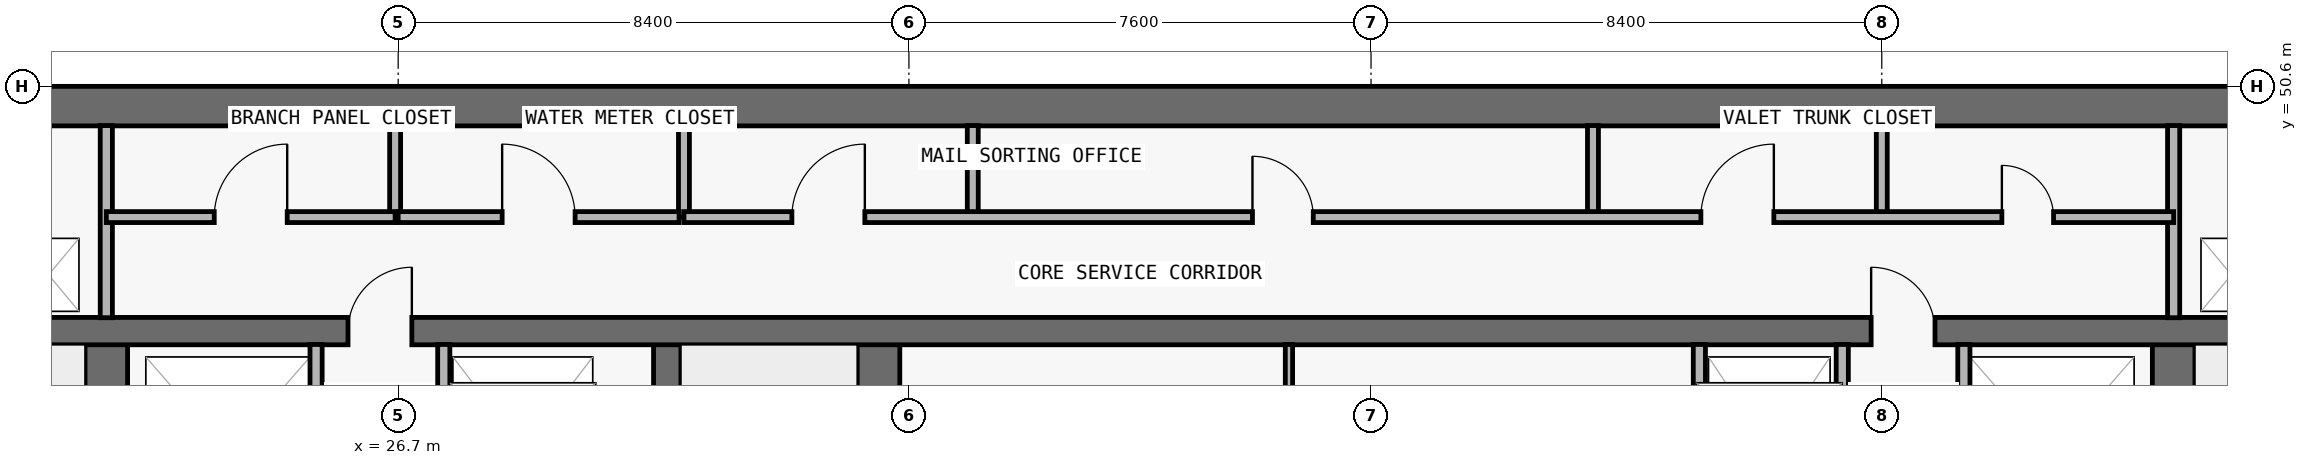
"""IFC4 building model, lengths in metres.
Left out: names, types, materials, properties, quantities, classifications, styles, units other than length and angle.
Written with IfcOpenShell. Run it as: python <this file> out.ifc"""

import sys

from ifc_helpers import new_model, si_unit, direction, frame, frame_2d, origin, place, context, subcontext, project, spatial, rectangle, extrude, element, fill, save


model = new_model("IFC4")
c1 = context("Model", 3, precision=1e-05, world=origin(), true_north=direction((0.0, 1.0)))
c2 = subcontext(c1, "Body", "Model", "MODEL_VIEW")
j1 = project(units=[si_unit("LENGTHUNIT", "METRE"), si_unit("PLANEANGLEUNIT", "RADIAN")], contexts=[c1])
p1 = place(None, origin())
s1 = spatial("IfcSite", under=j1, at=p1, CompositionType="ELEMENT")
p2 = place(p1, origin())
s2 = spatial("IfcBuilding", under=s1, at=p2, CompositionType="ELEMENT")
p3 = place(p2, frame((0.0, 0.0, 191.7)))
s3 = spatial("IfcBuildingStorey", under=s2, at=p3, CompositionType="ELEMENT", Elevation=191.7)
p4 = place(p3, frame((17.95, 50.275, 0.0), z_axis=(0.0, 0.0, 1.0), x_axis=(1.0, 0.0, 0.0)))
e1 = element("IfcWall", 1, at=p4, inside=s3, PredefinedType="SHEAR", context=c2, shape_type="SweptSolid", body=[
    extrude(rectangle(XDim=41.9, YDim=0.65, at=frame_2d((20.95, 0.0))), origin(), (0.0, 0.0, 1.0), 3.05),
])
p5 = place(p3, frame((21.9, 37.0, 0.0), z_axis=(0.0, 0.0, 1.0), x_axis=(0.0, 1.0, 0.0)))
e2 = element("IfcWall", 2, at=p5, inside=s3, PredefinedType="SHEAR", context=c2, shape_type="SweptSolid", body=[
    extrude(rectangle(XDim=9.575, YDim=0.7, at=frame_2d((4.788, 0.0))), origin(), (0.0, 0.0, 1.0), 3.05),
])
p6 = place(p5, frame((0.55, 0.0, 0.0)))
e3 = element("IfcOpeningElement", 3, at=p6, cuts=e2, PredefinedType="OPENING", context=c2, shape_type="SweptSolid", body=[
    extrude(rectangle(XDim=1.1, YDim=2.15, at=frame_2d((0.55, 1.075))), frame((0.0, 0.36, 0.0), z_axis=(0.0, -1.0, 0.0), x_axis=(1.0, 0.0, 0.0)), (0.0, 0.0, 1.0), 0.72),
])
p7 = place(p3, frame((55.9, 37.0, 0.0), z_axis=(0.0, 0.0, 1.0), x_axis=(0.0, 1.0, 0.0)))
e4 = element("IfcWall", 4, at=p7, inside=s3, PredefinedType="SHEAR", context=c2, shape_type="SweptSolid", body=[
    extrude(rectangle(XDim=9.575, YDim=0.7, at=frame_2d((4.788, 0.0))), origin(), (0.0, 0.0, 1.0), 3.05),
])
p8 = place(p7, frame((0.55, 0.0, 0.0)))
e5 = element("IfcOpeningElement", 5, at=p8, cuts=e4, PredefinedType="OPENING", context=c2, shape_type="SweptSolid", body=[
    extrude(rectangle(XDim=1.1, YDim=2.15, at=frame_2d((0.55, 1.075))), frame((0.0, 0.36, 0.0), z_axis=(0.0, -1.0, 0.0), x_axis=(1.0, 0.0, 0.0)), (0.0, 0.0, 1.0), 0.72),
])
p9 = place(p3, frame((31.125, 37.0, 0.0), z_axis=(0.0, 0.0, 1.0), x_axis=(0.0, 1.0, 0.0)))
e6 = element("IfcWall", 6, at=p9, inside=s3, PredefinedType="SHEAR", context=c2, shape_type="SweptSolid", body=[
    extrude(rectangle(XDim=9.575, YDim=0.45, at=frame_2d((4.788, 0.0))), origin(), (0.0, 0.0, 1.0), 3.05),
])
p10 = place(p3, frame((34.6, 37.0, 0.0), z_axis=(0.0, 0.0, 1.0), x_axis=(0.0, 1.0, 0.0)))
e7 = element("IfcWall", 7, at=p10, inside=s3, PredefinedType="SHEAR", context=c2, shape_type="SweptSolid", body=[
    extrude(rectangle(XDim=9.575, YDim=0.7, at=frame_2d((4.788, 0.0))), origin(), (0.0, 0.0, 1.0), 3.05),
])
p11 = place(p3, frame((18.3, 46.575, 0.0), z_axis=(0.0, 0.0, 1.0), x_axis=(1.0, 0.0, 0.0)))
e8 = element("IfcWall", 8, at=p11, inside=s3, PredefinedType="SHEAR", context=c2, shape_type="SweptSolid", body=[
    extrude(rectangle(XDim=41.2, YDim=0.45, at=frame_2d((20.6, 0.0))), origin(), (0.0, 0.0, 1.0), 3.05),
])
p12 = place(p11, frame((7.575, 0.0, 0.0)))
e9 = element("IfcOpeningElement", 9, at=p12, cuts=e8, PredefinedType="OPENING", context=c2, shape_type="SweptSolid", body=[
    extrude(rectangle(XDim=1.05, YDim=2.15, at=frame_2d((0.525, 1.075))), frame((0.0, 0.235, 0.0), z_axis=(0.0, -1.0, 0.0), x_axis=(1.0, 0.0, 0.0)), (0.0, 0.0, 1.0), 0.47),
])
p13 = place(p11, frame((32.625, 0.0, 0.0)))
e10 = element("IfcOpeningElement", 10, at=p13, cuts=e8, PredefinedType="OPENING", context=c2, shape_type="SweptSolid", body=[
    extrude(rectangle(XDim=1.05, YDim=2.15, at=frame_2d((0.525, 1.075))), frame((0.0, 0.235, 0.0), z_axis=(0.0, -1.0, 0.0), x_axis=(1.0, 0.0, 0.0)), (0.0, 0.0, 1.0), 0.47),
])
p14 = place(p3, frame((21.9, 46.795, 0.0), z_axis=(0.0, 0.0, 1.0), x_axis=(0.0, 1.0, 0.0)))
e11 = element("IfcWall", 11, at=p14, inside=s3, PredefinedType="PARTITIONING", context=c2, shape_type="SweptSolid", body=[
    extrude(rectangle(XDim=3.16, YDim=0.2, at=frame_2d((1.58, 0.0))), origin(), (0.0, 0.0, 1.0), 3.05),
])
p15 = place(p3, frame((25.35, 43.17, 0.0), z_axis=(0.0, 0.0, 1.0), x_axis=(0.0, 1.0, 0.0)))
e12 = element("IfcWall", 12, at=p15, inside=s3, PredefinedType="PARTITIONING", context=c2, shape_type="SweptSolid", body=[
    extrude(rectangle(XDim=3.185, YDim=0.2, at=frame_2d((1.593, 0.0))), origin(), (0.0, 0.0, 1.0), 3.05),
])
p16 = place(p3, frame((26.65, 48.45, 0.0), z_axis=(0.0, 0.0, 1.0), x_axis=(0.0, 1.0, 0.0)))
e13 = element("IfcWall", 13, at=p16, inside=s3, PredefinedType="PARTITIONING", context=c2, shape_type="SweptSolid", body=[
    extrude(rectangle(XDim=1.505, YDim=0.18, at=frame_2d((0.752, 0.0))), origin(), (0.0, 0.0, 1.0), 3.05),
])
p17 = place(p3, frame((27.45, 43.17, 0.0), z_axis=(0.0, 0.0, 1.0), x_axis=(0.0, 1.0, 0.0)))
e14 = element("IfcWall", 14, at=p17, inside=s3, PredefinedType="PARTITIONING", context=c2, shape_type="SweptSolid", body=[
    extrude(rectangle(XDim=3.185, YDim=0.2, at=frame_2d((1.593, 0.0))), origin(), (0.0, 0.0, 1.0), 3.05),
])
for number, where, z_axis, x_axis in (
    (15, (31.4, 48.45, 0.0), (0.0, 0.0, 1.0), (0.0, 1.0, 0.0)),
    (16, (36.15, 48.45, 0.0), (0.0, 0.0, 1.0), (0.0, 1.0, 0.0)),
):
    element("IfcWall", number, at=place(p3, frame(where, z_axis=z_axis, x_axis=x_axis)), inside=s3, PredefinedType="PARTITIONING", context=c2, shape_type="SweptSolid", body=[
        extrude(rectangle(XDim=1.505, YDim=0.18, at=frame_2d((0.752, 0.0))), origin(), (0.0, 0.0, 1.0), 3.05),
    ])
p18 = place(p3, frame((41.35, 43.17, 0.0), z_axis=(0.0, 0.0, 1.0), x_axis=(0.0, 1.0, 0.0)))
e17 = element("IfcWall", 17, at=p18, inside=s3, PredefinedType="PARTITIONING", context=c2, shape_type="SweptSolid", body=[
    extrude(rectangle(XDim=3.185, YDim=0.12, at=frame_2d((1.593, 0.0))), origin(), (0.0, 0.0, 1.0), 3.05),
])
p19 = place(p3, frame((46.35, 48.45, 0.0), z_axis=(0.0, 0.0, 1.0), x_axis=(0.0, 1.0, 0.0)))
e18 = element("IfcWall", 18, at=p19, inside=s3, PredefinedType="PARTITIONING", context=c2, shape_type="SweptSolid", body=[
    extrude(rectangle(XDim=1.505, YDim=0.18, at=frame_2d((0.752, 0.0))), origin(), (0.0, 0.0, 1.0), 3.05),
])
for number, where, z_axis, x_axis in (
    (19, (48.1, 43.17, 0.0), (0.0, 0.0, 1.0), (0.0, 1.0, 0.0)),
    (20, (50.45, 43.17, 0.0), (0.0, 0.0, 1.0), (0.0, 1.0, 0.0)),
):
    element("IfcWall", number, at=place(p3, frame(where, z_axis=z_axis, x_axis=x_axis)), inside=s3, PredefinedType="PARTITIONING", context=c2, shape_type="SweptSolid", body=[
        extrude(rectangle(XDim=3.185, YDim=0.2, at=frame_2d((1.593, 0.0))), origin(), (0.0, 0.0, 1.0), 3.05),
    ])
p20 = place(p3, frame((51.1, 48.45, 0.0), z_axis=(0.0, 0.0, 1.0), x_axis=(0.0, 1.0, 0.0)))
e21 = element("IfcWall", 21, at=p20, inside=s3, PredefinedType="PARTITIONING", context=c2, shape_type="SweptSolid", body=[
    extrude(rectangle(XDim=1.505, YDim=0.18, at=frame_2d((0.752, 0.0))), origin(), (0.0, 0.0, 1.0), 3.05),
])
p21 = place(p3, frame((52.45, 43.17, 0.0), z_axis=(0.0, 0.0, 1.0), x_axis=(0.0, 1.0, 0.0)))
e22 = element("IfcWall", 22, at=p21, inside=s3, PredefinedType="PARTITIONING", context=c2, shape_type="SweptSolid", body=[
    extrude(rectangle(XDim=3.185, YDim=0.2, at=frame_2d((1.593, 0.0))), origin(), (0.0, 0.0, 1.0), 3.05),
])
p22 = place(p3, frame((55.9, 46.795, 0.0), z_axis=(0.0, 0.0, 1.0), x_axis=(0.0, 1.0, 0.0)))
e23 = element("IfcWall", 23, at=p22, inside=s3, PredefinedType="PARTITIONING", context=c2, shape_type="SweptSolid", body=[
    extrude(rectangle(XDim=3.16, YDim=0.2, at=frame_2d((1.58, 0.0))), origin(), (0.0, 0.0, 1.0), 3.05),
])
p23 = place(p3, frame((21.9, 48.45, 0.0), z_axis=(0.0, 0.0, 1.0), x_axis=(1.0, 0.0, 0.0)))
e24 = element("IfcWall", 24, at=p23, inside=s3, PredefinedType="PARTITIONING", context=c2, shape_type="SweptSolid", body=[
    extrude(rectangle(XDim=4.75, YDim=0.18, at=frame_2d((2.375, 0.0))), origin(), (0.0, 0.0, 1.0), 3.05),
])
p24 = place(p23, frame((1.775, 0.0, 0.0)))
e25 = element("IfcOpeningElement", 25, at=p24, cuts=e24, PredefinedType="OPENING", context=c2, shape_type="SweptSolid", body=[
    extrude(rectangle(XDim=1.2, YDim=2.2, at=frame_2d((0.6, 1.1))), frame((0.0, 0.1, 0.0), z_axis=(0.0, -1.0, 0.0), x_axis=(1.0, 0.0, 0.0)), (0.0, 0.0, 1.0), 0.2),
])
p25 = place(p3, frame((26.7, 48.45, 0.0), z_axis=(0.0, 0.0, 1.0), x_axis=(1.0, 0.0, 0.0)))
e26 = element("IfcWall", 26, at=p25, inside=s3, PredefinedType="PARTITIONING", context=c2, shape_type="SweptSolid", body=[
    extrude(rectangle(XDim=4.62, YDim=0.18, at=frame_2d((2.31, 0.0))), origin(), (0.0, 0.0, 1.0), 3.05),
])
p26 = place(p25, frame((1.71, 0.0, 0.0)))
e27 = element("IfcOpeningElement", 27, at=p26, cuts=e26, PredefinedType="OPENING", context=c2, shape_type="SweptSolid", body=[
    extrude(rectangle(XDim=1.2, YDim=2.2, at=frame_2d((0.6, 1.1))), frame((0.0, 0.1, 0.0), z_axis=(0.0, -1.0, 0.0), x_axis=(1.0, 0.0, 0.0)), (0.0, 0.0, 1.0), 0.2),
])
p27 = place(p3, frame((31.4, 48.45, 0.0), z_axis=(0.0, 0.0, 1.0), x_axis=(1.0, 0.0, 0.0)))
e28 = element("IfcWall", 28, at=p27, inside=s3, PredefinedType="PARTITIONING", context=c2, shape_type="SweptSolid", body=[
    extrude(rectangle(XDim=24.5, YDim=0.18, at=frame_2d((12.25, 0.0))), origin(), (0.0, 0.0, 1.0), 3.05),
])
p28 = place(p27, frame((1.775, 0.0, 0.0)))
e29 = element("IfcOpeningElement", 29, at=p28, cuts=e28, PredefinedType="OPENING", context=c2, shape_type="SweptSolid", body=[
    extrude(rectangle(XDim=1.2, YDim=2.2, at=frame_2d((0.6, 1.1))), frame((0.0, 0.1, 0.0), z_axis=(0.0, -1.0, 0.0), x_axis=(1.0, 0.0, 0.0)), (0.0, 0.0, 1.0), 0.2),
])
p29 = place(p27, frame((9.35, 0.0, 0.0)))
e30 = element("IfcOpeningElement", 30, at=p29, cuts=e28, PredefinedType="OPENING", context=c2, shape_type="SweptSolid", body=[
    extrude(rectangle(XDim=1.0, YDim=2.2, at=frame_2d((0.5, 1.1))), frame((0.0, 0.1, 0.0), z_axis=(0.0, -1.0, 0.0), x_axis=(1.0, 0.0, 0.0)), (0.0, 0.0, 1.0), 0.2),
])
p30 = place(p27, frame((16.725, 0.0, 0.0)))
e31 = element("IfcOpeningElement", 31, at=p30, cuts=e28, PredefinedType="OPENING", context=c2, shape_type="SweptSolid", body=[
    extrude(rectangle(XDim=1.2, YDim=2.2, at=frame_2d((0.6, 1.1))), frame((0.0, 0.1, 0.0), z_axis=(0.0, -1.0, 0.0), x_axis=(1.0, 0.0, 0.0)), (0.0, 0.0, 1.0), 0.2),
])
p31 = place(p27, frame((21.675, 0.0, 0.0)))
e32 = element("IfcOpeningElement", 32, at=p31, cuts=e28, PredefinedType="OPENING", context=c2, shape_type="SweptSolid", body=[
    extrude(rectangle(XDim=0.85, YDim=2.1, at=frame_2d((0.425, 1.05))), frame((0.0, 0.1, 0.0), z_axis=(0.0, -1.0, 0.0), x_axis=(1.0, 0.0, 0.0)), (0.0, 0.0, 1.0), 0.2),
])
p32 = place(p12, origin())
e33 = element("IfcDoor", 33, at=p32, inside=s3, OperationType="SINGLE_SWING_RIGHT", PredefinedType="DOOR", context=c2, shape_type="SweptSolid", body=[
    extrude(rectangle(XDim=1.05, YDim=2.15, at=frame_2d((0.525, 1.075))), frame((0.0, 0.025, 0.0), z_axis=(0.0, -1.0, 0.0), x_axis=(1.0, 0.0, 0.0)), (0.0, 0.0, 1.0), 0.05),
])
fill(e9, e33)
p33 = place(p13, origin())
e34 = element("IfcDoor", 34, at=p33, inside=s3, OperationType="SINGLE_SWING_LEFT", PredefinedType="DOOR", context=c2, shape_type="SweptSolid", body=[
    extrude(rectangle(XDim=1.05, YDim=2.15, at=frame_2d((0.525, 1.075))), frame((0.0, 0.025, 0.0), z_axis=(0.0, -1.0, 0.0), x_axis=(1.0, 0.0, 0.0)), (0.0, 0.0, 1.0), 0.05),
])
fill(e10, e34)
p34 = place(p24, origin())
e35 = element("IfcDoor", 35, at=p34, inside=s3, OperationType="SINGLE_SWING_RIGHT", PredefinedType="DOOR", context=c2, shape_type="SweptSolid", body=[
    extrude(rectangle(XDim=1.2, YDim=2.2, at=frame_2d((0.6, 1.1))), frame((0.0, 0.025, 0.0), z_axis=(0.0, -1.0, 0.0), x_axis=(1.0, 0.0, 0.0)), (0.0, 0.0, 1.0), 0.05),
])
fill(e25, e35)
p35 = place(p26, origin())
e36 = element("IfcDoor", 36, at=p35, inside=s3, OperationType="SINGLE_SWING_LEFT", PredefinedType="DOOR", context=c2, shape_type="SweptSolid", body=[
    extrude(rectangle(XDim=1.2, YDim=2.2, at=frame_2d((0.6, 1.1))), frame((0.0, 0.025, 0.0), z_axis=(0.0, -1.0, 0.0), x_axis=(1.0, 0.0, 0.0)), (0.0, 0.0, 1.0), 0.05),
])
fill(e27, e36)
p36 = place(p28, origin())
e37 = element("IfcDoor", 37, at=p36, inside=s3, OperationType="SINGLE_SWING_RIGHT", PredefinedType="DOOR", context=c2, shape_type="SweptSolid", body=[
    extrude(rectangle(XDim=1.2, YDim=2.2, at=frame_2d((0.6, 1.1))), frame((0.0, 0.025, 0.0), z_axis=(0.0, -1.0, 0.0), x_axis=(1.0, 0.0, 0.0)), (0.0, 0.0, 1.0), 0.05),
])
fill(e29, e37)
p37 = place(p29, origin())
e38 = element("IfcDoor", 38, at=p37, inside=s3, OperationType="SINGLE_SWING_LEFT", PredefinedType="DOOR", context=c2, shape_type="SweptSolid", body=[
    extrude(rectangle(XDim=1.0, YDim=2.2, at=frame_2d((0.5, 1.1))), frame((0.0, 0.025, 0.0), z_axis=(0.0, -1.0, 0.0), x_axis=(1.0, 0.0, 0.0)), (0.0, 0.0, 1.0), 0.05),
])
fill(e30, e38)
p38 = place(p30, origin())
e39 = element("IfcDoor", 39, at=p38, inside=s3, OperationType="SINGLE_SWING_RIGHT", PredefinedType="DOOR", context=c2, shape_type="SweptSolid", body=[
    extrude(rectangle(XDim=1.2, YDim=2.2, at=frame_2d((0.6, 1.1))), frame((0.0, 0.025, 0.0), z_axis=(0.0, -1.0, 0.0), x_axis=(1.0, 0.0, 0.0)), (0.0, 0.0, 1.0), 0.05),
])
fill(e31, e39)
p39 = place(p31, origin())
e40 = element("IfcDoor", 40, at=p39, inside=s3, OperationType="SINGLE_SWING_LEFT", PredefinedType="DOOR", context=c2, shape_type="SweptSolid", body=[
    extrude(rectangle(XDim=0.85, YDim=2.1, at=frame_2d((0.425, 1.05))), frame((0.0, 0.025, 0.0), z_axis=(0.0, -1.0, 0.0), x_axis=(1.0, 0.0, 0.0)), (0.0, 0.0, 1.0), 0.05),
])
fill(e32, e40)
save(model, sys.argv[1])
